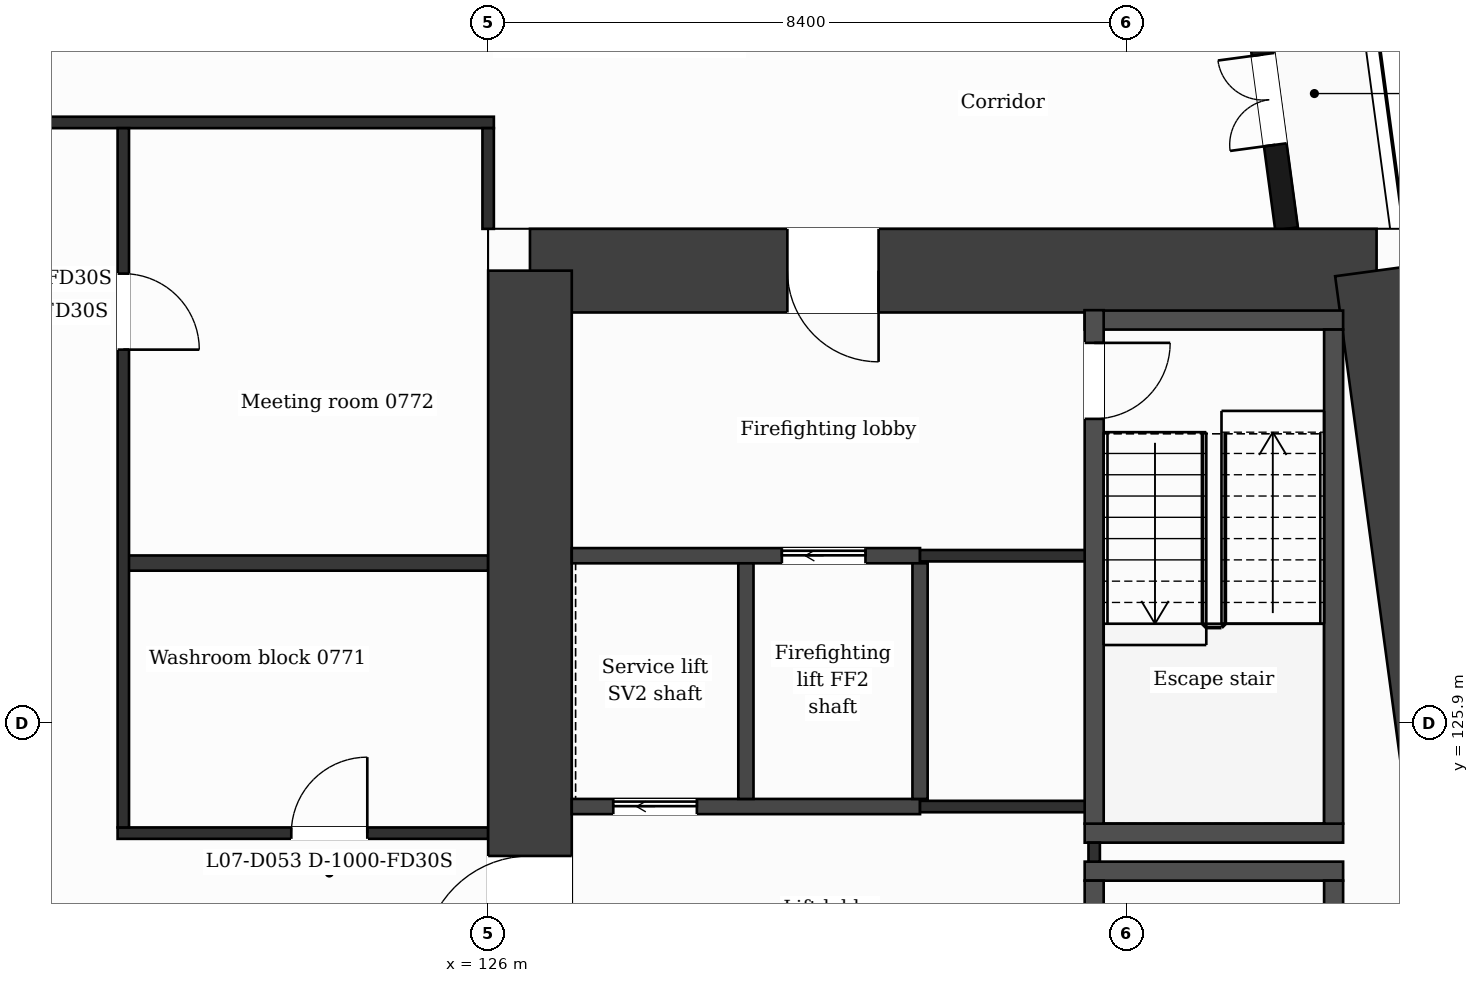
"""IFC4 building model, lengths in metres.
Left out: names, types, materials, properties, quantities, classifications, styles, units other than length and angle.
Written with IfcOpenShell. Run it as: python <this file> out.ifc"""

import sys

from ifc_helpers import new_model, si_unit, direction, frame, frame_2d, origin, place, context, subcontext, project, spatial, rectangle, extrude, element, fill, save


model = new_model("IFC4")
c1 = context("Model", 3, precision=1e-05, world=origin(), true_north=direction((0.0, 1.0)))
c2 = subcontext(c1, "Body", "Model", "MODEL_VIEW")
j1 = project(units=[si_unit("LENGTHUNIT", "METRE"), si_unit("PLANEANGLEUNIT", "RADIAN")], contexts=[c1])
p1 = place(None, origin())
s1 = spatial("IfcSite", under=j1, at=p1, CompositionType="ELEMENT")
p2 = place(p1, origin())
s2 = spatial("IfcBuilding", under=s1, at=p2, CompositionType="ELEMENT")
p3 = place(p2, frame((0.0, 0.0, 42.5)))
s3 = spatial("IfcBuildingStorey", under=s2, at=p3, CompositionType="ELEMENT", Elevation=42.5)
p4 = place(p3, frame((126.55, 131.85, 0.0), z_axis=(0.0, 0.0, 1.0), x_axis=(1.0, 0.0, 0.0)))
e1 = element("IfcWall", 1, at=p4, inside=s3, PredefinedType="SHEAR", context=c2, shape_type="SweptSolid", body=[
    extrude(rectangle(XDim=11.138, YDim=1.1, at=frame_2d((5.569, 0.0))), origin(), (0.0, 0.0, 1.0), 3.5),
])
p5 = place(p4, frame((3.386, 0.0, 0.0)))
e2 = element("IfcOpeningElement", 2, at=p5, cuts=e1, PredefinedType="OPENING", context=c2, shape_type="SweptSolid", body=[
    extrude(rectangle(XDim=1.2, YDim=2.1, at=frame_2d((0.6, 1.05))), frame((0.0, 0.56, 0.0), z_axis=(0.0, -1.0, 0.0), x_axis=(1.0, 0.0, 0.0)), (0.0, 0.0, 1.0), 1.12),
])
p6 = place(p3, frame((137.688, 131.85, 0.0), z_axis=(0.0, 0.0, 1.0), x_axis=(0.133411793472, -0.991060691059, 0.0)))
e3 = element("IfcWall", 3, at=p6, inside=s3, PredefinedType="SHEAR", context=c2, shape_type="SweptSolid", body=[
    extrude(rectangle(XDim=21.089, YDim=1.1, at=frame_2d((10.544, 0.0))), origin(), (0.0, 0.0, 1.0), 3.5),
])
p7 = place(p3, frame((126.55, 110.95, 0.0), z_axis=(0.0, 0.0, 1.0), x_axis=(0.0, 1.0, 0.0)))
e4 = element("IfcWall", 4, at=p7, inside=s3, PredefinedType="SHEAR", context=c2, shape_type="SweptSolid", body=[
    extrude(rectangle(XDim=20.9, YDim=1.1, at=frame_2d((10.45, 0.0))), origin(), (0.0, 0.0, 1.0), 3.5),
])
p8 = place(p7, frame((11.8, 0.0, 0.0)))
e5 = element("IfcOpeningElement", 5, at=p8, cuts=e4, PredefinedType="OPENING", context=c2, shape_type="SweptSolid", body=[
    extrude(rectangle(XDim=1.4, YDim=2.1, at=frame_2d((0.7, 1.05))), frame((0.0, 0.56, 0.0), z_axis=(0.0, -1.0, 0.0), x_axis=(1.0, 0.0, 0.0)), (0.0, 0.0, 1.0), 1.12),
])
p9 = place(p3, frame((136.504, 132.4, 0.0), z_axis=(0.0, 0.0, 1.0), x_axis=(-0.133399697462, 0.99106231929, 0.0)))
e6 = element("IfcWall", 6, at=p9, inside=s3, PredefinedType="SOLIDWALL", context=c2, shape_type="SweptSolid", body=[
    extrude(rectangle(XDim=6.74, YDim=0.3, at=frame_2d((3.37, 0.0))), origin(), (0.0, 0.0, 1.0), 3.18),
])
p10 = place(p9, frame((1.115, 0.0, 0.0)))
e7 = element("IfcOpeningElement", 7, at=p10, cuts=e6, PredefinedType="OPENING", context=c2, shape_type="SweptSolid", body=[
    extrude(rectangle(XDim=1.2, YDim=2.4, at=frame_2d((0.6, 1.2))), frame((0.0, 0.16, 0.0), z_axis=(0.0, -1.0, 0.0), x_axis=(1.0, 0.0, 0.0)), (0.0, 0.0, 1.0), 0.32),
])
p11 = place(p9, frame((3.835, 0.0, 0.9)))
e8 = element("IfcOpeningElement", 8, at=p11, cuts=e6, PredefinedType="OPENING", context=c2, shape_type="SweptSolid", body=[
    extrude(rectangle(XDim=2.4, YDim=2.1, at=frame_2d((1.2, 1.05))), frame((0.0, 0.16, 0.0), z_axis=(0.0, -1.0, 0.0), x_axis=(1.0, 0.0, 0.0)), (0.0, 0.0, 1.0), 0.32),
])
for number, where, z_axis, x_axis in (
    (9, (133.848, 123.95, 0.0), (0.0, 0.0, 1.0), (1.0, 0.0, 0.0)),
    (10, (133.848, 124.45, 0.0), (0.0, 0.0, 1.0), (1.0, 0.0, 0.0)),
):
    element("IfcWall", number, at=place(p3, frame(where, z_axis=z_axis, x_axis=x_axis)), inside=s3, PredefinedType="PARTITIONING", context=c2, shape_type="SweptSolid", body=[
        extrude(rectangle(XDim=3.4, YDim=0.25, at=frame_2d((1.7, 0.0))), origin(), (0.0, 0.0, 1.0), 3.18),
    ])
p12 = place(p3, frame((121.125, 124.45, 0.0), z_axis=(0.0, 0.0, 1.0), x_axis=(1.0, 0.0, 0.0)))
e11 = element("IfcWall", 11, at=p12, inside=s3, PredefinedType="PARTITIONING", context=c2, shape_type="SweptSolid", body=[
    extrude(rectangle(XDim=4.875, YDim=0.15, at=frame_2d((2.438, 0.0))), origin(), (0.0, 0.0, 1.0), 3.18),
])
p13 = place(p12, frame((2.285, 0.0, 0.0)))
e12 = element("IfcOpeningElement", 12, at=p13, cuts=e11, PredefinedType="OPENING", context=c2, shape_type="SweptSolid", body=[
    extrude(rectangle(XDim=1.0, YDim=2.1, at=frame_2d((0.5, 1.05))), frame((0.0, 0.085, 0.0), z_axis=(0.0, -1.0, 0.0), x_axis=(1.0, 0.0, 0.0)), (0.0, 0.0, 1.0), 0.17),
])
p14 = place(p3, frame((127.1, 124.8, 0.0), z_axis=(0.0, 0.0, 1.0), x_axis=(1.0, 0.0, 0.0)))
e13 = element("IfcWall", 13, at=p14, inside=s3, PredefinedType="PARTITIONING", context=c2, shape_type="SweptSolid", body=[
    extrude(rectangle(XDim=4.582, YDim=0.2, at=frame_2d((2.291, 0.0))), origin(), (0.0, 0.0, 1.0), 3.18),
])
p15 = place(p14, frame((0.546, 0.0, 0.0)))
e14 = element("IfcOpeningElement", 14, at=p15, cuts=e13, PredefinedType="OPENING", context=c2, shape_type="SweptSolid", body=[
    extrude(rectangle(XDim=1.1, YDim=2.1, at=frame_2d((0.55, 1.05))), frame((0.0, 0.11, 0.0), z_axis=(0.0, -1.0, 0.0), x_axis=(1.0, 0.0, 0.0)), (0.0, 0.0, 1.0), 0.22),
])
p16 = place(p3, frame((131.682, 124.8, 0.0), z_axis=(0.0, 0.0, 1.0), x_axis=(1.0, 0.0, 0.0)))
e15 = element("IfcWall", 15, at=p16, inside=s3, PredefinedType="PARTITIONING", context=c2, shape_type="SweptSolid", body=[
    extrude(rectangle(XDim=2.416, YDim=0.15, at=frame_2d((1.208, 0.0))), origin(), (0.0, 0.0, 1.0), 3.18),
])
p17 = place(p3, frame((121.2, 128.003, 0.0), z_axis=(0.0, 0.0, 1.0), x_axis=(1.0, 0.0, 0.0)))
e16 = element("IfcWall", 16, at=p17, inside=s3, PredefinedType="PARTITIONING", context=c2, shape_type="SweptSolid", body=[
    extrude(rectangle(XDim=4.8, YDim=0.2, at=frame_2d((2.4, 0.0))), origin(), (0.0, 0.0, 1.0), 3.18),
])
p18 = place(p3, frame((127.1, 128.1, 0.0), z_axis=(0.0, 0.0, 1.0), x_axis=(1.0, 0.0, 0.0)))
e17 = element("IfcWall", 17, at=p18, inside=s3, PredefinedType="PARTITIONING", context=c2, shape_type="SweptSolid", body=[
    extrude(rectangle(XDim=4.582, YDim=0.2, at=frame_2d((2.291, 0.0))), origin(), (0.0, 0.0, 1.0), 3.18),
])
p19 = place(p18, frame((2.764, 0.0, 0.0)))
e18 = element("IfcOpeningElement", 18, at=p19, cuts=e17, PredefinedType="OPENING", context=c2, shape_type="SweptSolid", body=[
    extrude(rectangle(XDim=1.1, YDim=2.1, at=frame_2d((0.55, 1.05))), frame((0.0, 0.11, 0.0), z_axis=(0.0, -1.0, 0.0), x_axis=(1.0, 0.0, 0.0)), (0.0, 0.0, 1.0), 0.22),
])
p20 = place(p3, frame((131.682, 128.1, 0.0), z_axis=(0.0, 0.0, 1.0), x_axis=(1.0, 0.0, 0.0)))
e19 = element("IfcWall", 19, at=p20, inside=s3, PredefinedType="PARTITIONING", context=c2, shape_type="SweptSolid", body=[
    extrude(rectangle(XDim=2.291, YDim=0.15, at=frame_2d((1.146, 0.0))), origin(), (0.0, 0.0, 1.0), 3.18),
])
p21 = place(p3, frame((133.848, 131.2, 0.0), z_axis=(0.0, 0.0, 1.0), x_axis=(1.0, 0.0, 0.0)))
e20 = element("IfcWall", 20, at=p21, inside=s3, PredefinedType="PARTITIONING", context=c2, shape_type="SweptSolid", body=[
    extrude(rectangle(XDim=3.4, YDim=0.25, at=frame_2d((1.7, 0.0))), origin(), (0.0, 0.0, 1.0), 3.18),
])
p22 = place(p3, frame((100.725, 133.8, 0.0), z_axis=(0.0, 0.0, 1.0), x_axis=(1.0, 0.0, 0.0)))
e21 = element("IfcWall", 21, at=p22, inside=s3, PredefinedType="PARTITIONING", context=c2, shape_type="SweptSolid", body=[
    extrude(rectangle(XDim=25.35, YDim=0.15, at=frame_2d((12.675, 0.0))), origin(), (0.0, 0.0, 1.0), 3.18),
])
p23 = place(p3, frame((121.2, 124.525, 0.0), z_axis=(0.0, 0.0, 1.0), x_axis=(0.0, 1.0, 0.0)))
e22 = element("IfcWall", 22, at=p23, inside=s3, PredefinedType="PARTITIONING", context=c2, shape_type="SweptSolid", body=[
    extrude(rectangle(XDim=9.2, YDim=0.15, at=frame_2d((4.6, 0.0))), origin(), (0.0, 0.0, 1.0), 3.18),
])
p24 = place(p23, frame((6.286, 0.0, 0.0)))
e23 = element("IfcOpeningElement", 23, at=p24, cuts=e22, PredefinedType="OPENING", context=c2, shape_type="SweptSolid", body=[
    extrude(rectangle(XDim=1.0, YDim=2.1, at=frame_2d((0.5, 1.05))), frame((0.0, 0.085, 0.0), z_axis=(0.0, -1.0, 0.0), x_axis=(1.0, 0.0, 0.0)), (0.0, 0.0, 1.0), 0.17),
])
p25 = place(p3, frame((126.0, 132.4, 0.0), z_axis=(0.0, 0.0, 1.0), x_axis=(0.0, 1.0, 0.0)))
e24 = element("IfcWall", 24, at=p25, inside=s3, PredefinedType="PARTITIONING", context=c2, shape_type="SweptSolid", body=[
    extrude(rectangle(XDim=1.325, YDim=0.15, at=frame_2d((0.663, 0.0))), origin(), (0.0, 0.0, 1.0), 3.18),
])
for number, where, z_axis, x_axis in (
    (25, (129.391, 124.9, 0.0), (0.0, 0.0, 1.0), (0.0, 1.0, 0.0)),
    (26, (131.682, 124.9, 0.0), (0.0, 0.0, 1.0), (0.0, 1.0, 0.0)),
):
    element("IfcWall", number, at=place(p3, frame(where, z_axis=z_axis, x_axis=x_axis)), inside=s3, PredefinedType="PARTITIONING", context=c2, shape_type="SweptSolid", body=[
        extrude(rectangle(XDim=3.1, YDim=0.2, at=frame_2d((1.55, 0.0))), origin(), (0.0, 0.0, 1.0), 3.18),
    ])
p26 = place(p3, frame((133.973, 124.075, 0.0), z_axis=(0.0, 0.0, 1.0), x_axis=(0.0, 1.0, 0.0)))
e27 = element("IfcWall", 27, at=p26, inside=s3, PredefinedType="PARTITIONING", context=c2, shape_type="SweptSolid", body=[
    extrude(rectangle(XDim=0.25, YDim=0.15, at=frame_2d((0.125, 0.0))), origin(), (0.0, 0.0, 1.0), 3.18),
])
p27 = place(p3, frame((133.973, 117.07, 0.0), z_axis=(0.0, 0.0, 1.0), x_axis=(0.0, 1.0, 0.0)))
e28 = element("IfcWall", 28, at=p27, inside=s3, PredefinedType="PARTITIONING", context=c2, shape_type="SweptSolid", body=[
    extrude(rectangle(XDim=6.755, YDim=0.25, at=frame_2d((3.377, 0.0))), origin(), (0.0, 0.0, 1.0), 3.18),
])
p28 = place(p27, frame((5.455, 0.0, 0.0)))
e29 = element("IfcOpeningElement", 29, at=p28, cuts=e28, PredefinedType="OPENING", context=c2, shape_type="SweptSolid", body=[
    extrude(rectangle(XDim=0.95, YDim=2.1, at=frame_2d((0.475, 1.05))), frame((0.0, 0.135, 0.0), z_axis=(0.0, -1.0, 0.0), x_axis=(1.0, 0.0, 0.0)), (0.0, 0.0, 1.0), 0.27),
])
p29 = place(p3, frame((133.973, 124.575, 0.0), z_axis=(0.0, 0.0, 1.0), x_axis=(0.0, 1.0, 0.0)))
e30 = element("IfcWall", 30, at=p29, inside=s3, PredefinedType="PARTITIONING", context=c2, shape_type="SweptSolid", body=[
    extrude(rectangle(XDim=6.755, YDim=0.25, at=frame_2d((3.377, 0.0))), origin(), (0.0, 0.0, 1.0), 3.18),
])
p30 = place(p29, frame((5.325, 0.0, 0.0)))
e31 = element("IfcOpeningElement", 31, at=p30, cuts=e30, PredefinedType="OPENING", context=c2, shape_type="SweptSolid", body=[
    extrude(rectangle(XDim=1.0, YDim=2.1, at=frame_2d((0.5, 1.05))), frame((0.0, 0.135, 0.0), z_axis=(0.0, -1.0, 0.0), x_axis=(1.0, 0.0, 0.0)), (0.0, 0.0, 1.0), 0.27),
])
p31 = place(p3, frame((137.123, 117.07, 0.0), z_axis=(0.0, 0.0, 1.0), x_axis=(0.0, 1.0, 0.0)))
e32 = element("IfcWall", 32, at=p31, inside=s3, PredefinedType="PARTITIONING", context=c2, shape_type="SweptSolid", body=[
    extrude(rectangle(XDim=6.755, YDim=0.25, at=frame_2d((3.377, 0.0))), origin(), (0.0, 0.0, 1.0), 3.18),
])
p32 = place(p3, frame((137.123, 124.575, 0.0), z_axis=(0.0, 0.0, 1.0), x_axis=(0.0, 1.0, 0.0)))
e33 = element("IfcWall", 33, at=p32, inside=s3, PredefinedType="PARTITIONING", context=c2, shape_type="SweptSolid", body=[
    extrude(rectangle(XDim=6.5, YDim=0.25, at=frame_2d((3.25, 0.0))), origin(), (0.0, 0.0, 1.0), 3.18),
])
p33 = place(p10, origin())
e34 = element("IfcDoor", 34, at=p33, inside=s3, OperationType="DOUBLE_DOOR_SINGLE_SWING", PredefinedType="DOOR", context=c2, shape_type="SweptSolid", body=[
    extrude(rectangle(XDim=1.2, YDim=2.4, at=frame_2d((0.6, 1.2))), frame((0.0, 0.025, 0.0), z_axis=(0.0, -1.0, 0.0), x_axis=(1.0, 0.0, 0.0)), (0.0, 0.0, 1.0), 0.05),
])
fill(e7, e34)
p34 = place(p19, origin())
e35 = element("IfcDoor", 35, at=p34, inside=s3, OperationType="SLIDING_TO_LEFT", PredefinedType="DOOR", context=c2, shape_type="SweptSolid", body=[
    extrude(rectangle(XDim=1.1, YDim=2.1, at=frame_2d((0.55, 1.05))), frame((0.0, 0.025, 0.0), z_axis=(0.0, -1.0, 0.0), x_axis=(1.0, 0.0, 0.0)), (0.0, 0.0, 1.0), 0.05),
])
fill(e18, e35)
p35 = place(p15, origin())
e36 = element("IfcDoor", 36, at=p35, inside=s3, OperationType="SLIDING_TO_LEFT", PredefinedType="DOOR", context=c2, shape_type="SweptSolid", body=[
    extrude(rectangle(XDim=1.1, YDim=2.1, at=frame_2d((0.55, 1.05))), frame((0.0, 0.025, 0.0), z_axis=(0.0, -1.0, 0.0), x_axis=(1.0, 0.0, 0.0)), (0.0, 0.0, 1.0), 0.05),
])
fill(e14, e36)
p36 = place(p30, origin())
e37 = element("IfcDoor", 37, at=p36, inside=s3, OperationType="SINGLE_SWING_RIGHT", PredefinedType="DOOR", context=c2, shape_type="SweptSolid", body=[
    extrude(rectangle(XDim=1.0, YDim=2.1, at=frame_2d((0.5, 1.05))), frame((0.0, 0.025, 0.0), z_axis=(0.0, -1.0, 0.0), x_axis=(1.0, 0.0, 0.0)), (0.0, 0.0, 1.0), 0.05),
])
fill(e31, e37)
p37 = place(p13, origin())
e38 = element("IfcDoor", 38, at=p37, inside=s3, OperationType="SINGLE_SWING_RIGHT", PredefinedType="DOOR", context=c2, shape_type="SweptSolid", body=[
    extrude(rectangle(XDim=1.0, YDim=2.1, at=frame_2d((0.5, 1.05))), frame((0.0, 0.025, 0.0), z_axis=(0.0, -1.0, 0.0), x_axis=(1.0, 0.0, 0.0)), (0.0, 0.0, 1.0), 0.05),
])
fill(e12, e38)
p38 = place(p24, origin())
e39 = element("IfcDoor", 39, at=p38, inside=s3, OperationType="SINGLE_SWING_LEFT", PredefinedType="DOOR", context=c2, shape_type="SweptSolid", body=[
    extrude(rectangle(XDim=1.0, YDim=2.1, at=frame_2d((0.5, 1.05))), frame((0.0, 0.025, 0.0), z_axis=(0.0, -1.0, 0.0), x_axis=(1.0, 0.0, 0.0)), (0.0, 0.0, 1.0), 0.05),
])
fill(e23, e39)
p39 = place(p5, origin())
e40 = element("IfcDoor", 40, at=p39, inside=s3, OperationType="SINGLE_SWING_RIGHT", PredefinedType="DOOR", context=c2, shape_type="SweptSolid", body=[
    extrude(rectangle(XDim=1.2, YDim=2.1, at=frame_2d((0.6, 1.05))), frame((0.0, 0.025, 0.0), z_axis=(0.0, -1.0, 0.0), x_axis=(1.0, 0.0, 0.0)), (0.0, 0.0, 1.0), 0.05),
])
fill(e2, e40)
p40 = place(p8, origin())
e41 = element("IfcDoor", 41, at=p40, inside=s3, OperationType="SINGLE_SWING_LEFT", PredefinedType="DOOR", context=c2, shape_type="SweptSolid", body=[
    extrude(rectangle(XDim=1.4, YDim=2.1, at=frame_2d((0.7, 1.05))), frame((0.0, 0.025, 0.0), z_axis=(0.0, -1.0, 0.0), x_axis=(1.0, 0.0, 0.0)), (0.0, 0.0, 1.0), 0.05),
])
fill(e5, e41)
save(model, sys.argv[1])
